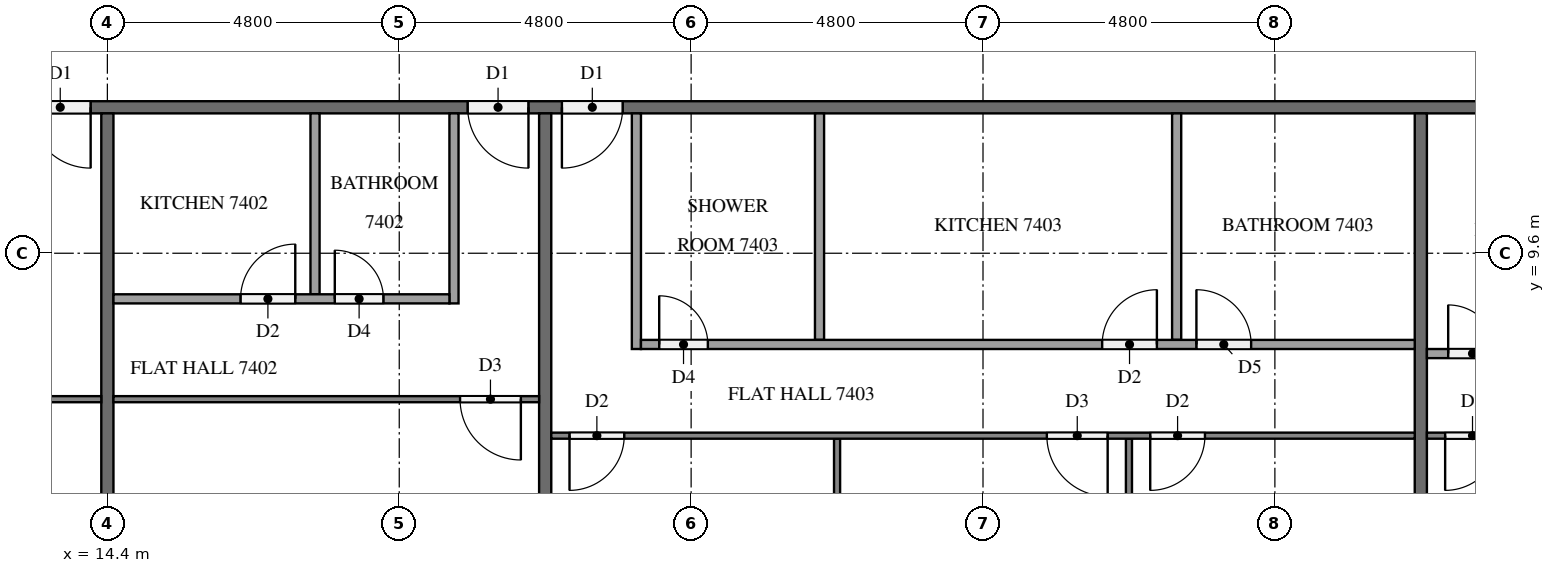
"""IFC4 building model, lengths in metres.
Left out: names, types, materials, properties, quantities, classifications, styles, units other than length and angle.
Written with IfcOpenShell. Run it as: python <this file> out.ifc"""

import sys

from ifc_helpers import new_model, si_unit, direction, frame, frame_2d, origin, place, context, subcontext, project, spatial, rectangle, extrude, element, fill, save


model = new_model("IFC4")
c1 = context("Model", 3, precision=1e-05, world=origin(), true_north=direction((0.0, 1.0)))
c2 = subcontext(c1, "Body", "Model", "MODEL_VIEW")
j1 = project(units=[si_unit("LENGTHUNIT", "METRE"), si_unit("PLANEANGLEUNIT", "RADIAN")], contexts=[c1])
p1 = place(None, origin())
s1 = spatial("IfcSite", under=j1, at=p1, CompositionType="ELEMENT")
p2 = place(p1, origin())
s2 = spatial("IfcBuilding", under=s1, at=p2, CompositionType="ELEMENT")
p3 = place(p2, frame((0.0, 0.0, 282.6)))
s3 = spatial("IfcBuildingStorey", under=s2, at=p3, CompositionType="ELEMENT", Elevation=282.6)
p4 = place(p3, frame((50.5, 12.0, 0.0), z_axis=(0.0, 0.0, 1.0), x_axis=(-1.0, 0.0, 0.0)))
e1 = element("IfcWall", 1, at=p4, inside=s3, PredefinedType="PARTITIONING", context=c2, shape_type="SweptSolid", body=[
    extrude(rectangle(XDim=38.6, YDim=0.2, at=frame_2d((19.3, 0.0))), origin(), (0.0, 0.0, 1.0), 3.2),
])
p5 = place(p4, frame((36.375, 0.0, 0.0)))
e2 = element("IfcOpeningElement", 2, at=p5, cuts=e1, PredefinedType="OPENING", context=c2, shape_type="SweptSolid", body=[
    extrude(rectangle(XDim=1.0, YDim=2.1, at=frame_2d((0.5, 1.05))), frame((0.0, 0.11, 0.0), z_axis=(0.0, -1.0, 0.0), x_axis=(1.0, 0.0, 0.0)), (0.0, 0.0, 1.0), 0.22),
])
p6 = place(p4, frame((29.175, 0.0, 0.0)))
e3 = element("IfcOpeningElement", 3, at=p6, cuts=e1, PredefinedType="OPENING", context=c2, shape_type="SweptSolid", body=[
    extrude(rectangle(XDim=1.0, YDim=2.1, at=frame_2d((0.5, 1.05))), frame((0.0, 0.11, 0.0), z_axis=(0.0, -1.0, 0.0), x_axis=(1.0, 0.0, 0.0)), (0.0, 0.0, 1.0), 0.22),
])
p7 = place(p4, frame((27.625, 0.0, 0.0)))
e4 = element("IfcOpeningElement", 4, at=p7, cuts=e1, PredefinedType="OPENING", context=c2, shape_type="SweptSolid", body=[
    extrude(rectangle(XDim=1.0, YDim=2.1, at=frame_2d((0.5, 1.05))), frame((0.0, 0.11, 0.0), z_axis=(0.0, -1.0, 0.0), x_axis=(1.0, 0.0, 0.0)), (0.0, 0.0, 1.0), 0.22),
])
p8 = place(p4, frame((2.775, 0.0, 0.0)))
e5 = element("IfcOpeningElement", 5, at=p8, cuts=e1, PredefinedType="OPENING", context=c2, shape_type="SweptSolid", body=[
    extrude(rectangle(XDim=1.0, YDim=2.1, at=frame_2d((0.5, 1.05))), frame((0.0, 0.11, 0.0), z_axis=(0.0, -1.0, 0.0), x_axis=(1.0, 0.0, 0.0)), (0.0, 0.0, 1.0), 0.22),
])
p9 = place(p4, frame((1.225, 0.0, 0.0)))
e6 = element("IfcOpeningElement", 6, at=p9, cuts=e1, PredefinedType="OPENING", context=c2, shape_type="SweptSolid", body=[
    extrude(rectangle(XDim=1.0, YDim=2.1, at=frame_2d((0.5, 1.05))), frame((0.0, 0.11, 0.0), z_axis=(0.0, -1.0, 0.0), x_axis=(1.0, 0.0, 0.0)), (0.0, 0.0, 1.0), 0.22),
])
p10 = place(p3, frame((14.4, 11.9, 0.0), z_axis=(0.0, 0.0, 1.0), x_axis=(0.0, -1.0, 0.0)))
e7 = element("IfcWall", 7, at=p10, inside=s3, PredefinedType="PARTITIONING", context=c2, shape_type="SweptSolid", body=[
    extrude(rectangle(XDim=11.65, YDim=0.2, at=frame_2d((5.825, 0.0))), origin(), (0.0, 0.0, 1.0), 3.2),
])
for number, where, z_axis, x_axis in (
    (8, (21.6, 11.9, 0.0), (0.0, 0.0, 1.0), (0.0, -1.0, 0.0)),
    (9, (36.0, 11.9, 0.0), (0.0, 0.0, 1.0), (0.0, -1.0, 0.0)),
):
    element("IfcWall", number, at=place(p3, frame(where, z_axis=z_axis, x_axis=x_axis)), inside=s3, PredefinedType="PARTITIONING", context=c2, shape_type="SweptSolid", body=[
        extrude(rectangle(XDim=11.8, YDim=0.2, at=frame_2d((5.9, 0.0))), origin(), (0.0, 0.0, 1.0), 3.2),
    ])
p11 = place(p3, frame((14.3, 7.2, 0.0), z_axis=(0.0, 0.0, 1.0), x_axis=(-1.0, 0.0, 0.0)))
e10 = element("IfcWall", 10, at=p11, inside=s3, PredefinedType="PARTITIONING", context=c2, shape_type="SweptSolid", body=[
    extrude(rectangle(XDim=14.2, YDim=0.1, at=frame_2d((7.1, 0.0))), origin(), (0.0, 0.0, 1.0), 3.2),
])
p12 = place(p11, frame((3.45, 0.0, 0.0)))
e11 = element("IfcOpeningElement", 11, at=p12, cuts=e10, PredefinedType="OPENING", context=c2, shape_type="SweptSolid", body=[
    extrude(rectangle(XDim=0.9, YDim=2.1, at=frame_2d((0.45, 1.05))), frame((0.0, 0.06, 0.0), z_axis=(0.0, -1.0, 0.0), x_axis=(1.0, 0.0, 0.0)), (0.0, 0.0, 1.0), 0.12),
])
p13 = place(p11, frame((5.05, 0.0, 0.0)))
e12 = element("IfcOpeningElement", 12, at=p13, cuts=e10, PredefinedType="OPENING", context=c2, shape_type="SweptSolid", body=[
    extrude(rectangle(XDim=0.9, YDim=2.1, at=frame_2d((0.45, 1.05))), frame((0.0, 0.06, 0.0), z_axis=(0.0, -1.0, 0.0), x_axis=(1.0, 0.0, 0.0)), (0.0, 0.0, 1.0), 0.12),
])
p14 = place(p11, frame((12.9, 0.0, 0.0)))
e13 = element("IfcOpeningElement", 13, at=p14, cuts=e10, PredefinedType="OPENING", context=c2, shape_type="SweptSolid", body=[
    extrude(rectangle(XDim=1.0, YDim=2.1, at=frame_2d((0.5, 1.05))), frame((0.0, 0.06, 0.0), z_axis=(0.0, -1.0, 0.0), x_axis=(1.0, 0.0, 0.0)), (0.0, 0.0, 1.0), 0.12),
])
p15 = place(p3, frame((21.5, 7.2, 0.0), z_axis=(0.0, 0.0, 1.0), x_axis=(-1.0, 0.0, 0.0)))
e14 = element("IfcWall", 14, at=p15, inside=s3, PredefinedType="PARTITIONING", context=c2, shape_type="SweptSolid", body=[
    extrude(rectangle(XDim=7.0, YDim=0.1, at=frame_2d((3.5, 0.0))), origin(), (0.0, 0.0, 1.0), 3.2),
])
p16 = place(p15, frame((0.3, 0.0, 0.0)))
e15 = element("IfcOpeningElement", 15, at=p16, cuts=e14, PredefinedType="OPENING", context=c2, shape_type="SweptSolid", body=[
    extrude(rectangle(XDim=1.0, YDim=2.1, at=frame_2d((0.5, 1.05))), frame((0.0, 0.06, 0.0), z_axis=(0.0, -1.0, 0.0), x_axis=(1.0, 0.0, 0.0)), (0.0, 0.0, 1.0), 0.12),
])
p17 = place(p3, frame((17.815, 11.9, 0.0), z_axis=(0.0, 0.0, 1.0), x_axis=(0.0, -1.0, 0.0)))
e16 = element("IfcWall", 16, at=p17, inside=s3, PredefinedType="PARTITIONING", context=c2, shape_type="SweptSolid", body=[
    extrude(rectangle(XDim=2.975, YDim=0.15, at=frame_2d((1.487, 0.0))), origin(), (0.0, 0.0, 1.0), 3.2),
])
p18 = place(p3, frame((20.1, 11.9, 0.0), z_axis=(0.0, 0.0, 1.0), x_axis=(0.0, -1.0, 0.0)))
e17 = element("IfcWall", 17, at=p18, inside=s3, PredefinedType="PARTITIONING", context=c2, shape_type="SweptSolid", body=[
    extrude(rectangle(XDim=3.125, YDim=0.15, at=frame_2d((1.562, 0.0))), origin(), (0.0, 0.0, 1.0), 3.2),
])
p19 = place(p3, frame((14.5, 8.85, 0.0), z_axis=(0.0, 0.0, 1.0), x_axis=(1.0, 0.0, 0.0)))
e18 = element("IfcWall", 18, at=p19, inside=s3, PredefinedType="PARTITIONING", context=c2, shape_type="SweptSolid", body=[
    extrude(rectangle(XDim=5.525, YDim=0.15, at=frame_2d((2.762, 0.0))), origin(), (0.0, 0.0, 1.0), 3.2),
])
p20 = place(p19, frame((3.64, 0.0, 0.0)))
e19 = element("IfcOpeningElement", 19, at=p20, cuts=e18, PredefinedType="OPENING", context=c2, shape_type="SweptSolid", body=[
    extrude(rectangle(XDim=0.8, YDim=2.1, at=frame_2d((0.4, 1.05))), frame((0.0, 0.085, 0.0), z_axis=(0.0, -1.0, 0.0), x_axis=(1.0, 0.0, 0.0)), (0.0, 0.0, 1.0), 0.17),
])
p21 = place(p19, frame((2.09, 0.0, 0.0)))
e20 = element("IfcOpeningElement", 20, at=p21, cuts=e18, PredefinedType="OPENING", context=c2, shape_type="SweptSolid", body=[
    extrude(rectangle(XDim=0.9, YDim=2.1, at=frame_2d((0.45, 1.05))), frame((0.0, 0.085, 0.0), z_axis=(0.0, -1.0, 0.0), x_axis=(1.0, 0.0, 0.0)), (0.0, 0.0, 1.0), 0.17),
])
for number, where, z_axis, x_axis in (
    (21, (26.4, 6.55, 0.0), (0.0, 0.0, 1.0), (0.0, -1.0, 0.0)),
    (22, (31.2, 6.55, 0.0), (0.0, 0.0, 1.0), (0.0, -1.0, 0.0)),
):
    element("IfcWall", number, at=place(p3, frame(where, z_axis=z_axis, x_axis=x_axis)), inside=s3, PredefinedType="PARTITIONING", context=c2, shape_type="SweptSolid", body=[
        extrude(rectangle(XDim=6.45, YDim=0.1, at=frame_2d((3.225, 0.0))), origin(), (0.0, 0.0, 1.0), 3.2),
    ])
p22 = place(p3, frame((35.9, 6.6, 0.0), z_axis=(0.0, 0.0, 1.0), x_axis=(-1.0, 0.0, 0.0)))
e23 = element("IfcWall", 23, at=p22, inside=s3, PredefinedType="PARTITIONING", context=c2, shape_type="SweptSolid", body=[
    extrude(rectangle(XDim=14.2, YDim=0.1, at=frame_2d((7.1, 0.0))), origin(), (0.0, 0.0, 1.0), 3.2),
])
p23 = place(p22, frame((13.0, 0.0, 0.0)))
e24 = element("IfcOpeningElement", 24, at=p23, cuts=e23, PredefinedType="OPENING", context=c2, shape_type="SweptSolid", body=[
    extrude(rectangle(XDim=0.9, YDim=2.1, at=frame_2d((0.45, 1.05))), frame((0.0, 0.06, 0.0), z_axis=(0.0, -1.0, 0.0), x_axis=(1.0, 0.0, 0.0)), (0.0, 0.0, 1.0), 0.12),
])
p24 = place(p22, frame((5.05, 0.0, 0.0)))
e25 = element("IfcOpeningElement", 25, at=p24, cuts=e23, PredefinedType="OPENING", context=c2, shape_type="SweptSolid", body=[
    extrude(rectangle(XDim=1.0, YDim=2.1, at=frame_2d((0.5, 1.05))), frame((0.0, 0.06, 0.0), z_axis=(0.0, -1.0, 0.0), x_axis=(1.0, 0.0, 0.0)), (0.0, 0.0, 1.0), 0.12),
])
p25 = place(p22, frame((3.45, 0.0, 0.0)))
e26 = element("IfcOpeningElement", 26, at=p25, cuts=e23, PredefinedType="OPENING", context=c2, shape_type="SweptSolid", body=[
    extrude(rectangle(XDim=0.9, YDim=2.1, at=frame_2d((0.45, 1.05))), frame((0.0, 0.06, 0.0), z_axis=(0.0, -1.0, 0.0), x_axis=(1.0, 0.0, 0.0)), (0.0, 0.0, 1.0), 0.12),
])
for number, where, z_axis, x_axis in (
    (27, (26.112, 11.9, 0.0), (0.0, 0.0, 1.0), (0.0, -1.0, 0.0)),
    (28, (31.985, 11.9, 0.0), (0.0, 0.0, 1.0), (0.0, -1.0, 0.0)),
):
    element("IfcWall", number, at=place(p3, frame(where, z_axis=z_axis, x_axis=x_axis)), inside=s3, PredefinedType="PARTITIONING", context=c2, shape_type="SweptSolid", body=[
        extrude(rectangle(XDim=3.725, YDim=0.15, at=frame_2d((1.862, 0.0))), origin(), (0.0, 0.0, 1.0), 3.2),
    ])
p26 = place(p3, frame((23.1, 11.9, 0.0), z_axis=(0.0, 0.0, 1.0), x_axis=(0.0, -1.0, 0.0)))
e29 = element("IfcWall", 29, at=p26, inside=s3, PredefinedType="PARTITIONING", context=c2, shape_type="SweptSolid", body=[
    extrude(rectangle(XDim=3.875, YDim=0.15, at=frame_2d((1.938, 0.0))), origin(), (0.0, 0.0, 1.0), 3.2),
])
p27 = place(p3, frame((23.175, 8.1, 0.0), z_axis=(0.0, 0.0, 1.0), x_axis=(1.0, 0.0, 0.0)))
e30 = element("IfcWall", 30, at=p27, inside=s3, PredefinedType="PARTITIONING", context=c2, shape_type="SweptSolid", body=[
    extrude(rectangle(XDim=12.725, YDim=0.15, at=frame_2d((6.362, 0.0))), origin(), (0.0, 0.0, 1.0), 3.2),
])
p28 = place(p27, frame((0.3, 0.0, 0.0)))
e31 = element("IfcOpeningElement", 31, at=p28, cuts=e30, PredefinedType="OPENING", context=c2, shape_type="SweptSolid", body=[
    extrude(rectangle(XDim=0.8, YDim=2.1, at=frame_2d((0.4, 1.05))), frame((0.0, 0.085, 0.0), z_axis=(0.0, -1.0, 0.0), x_axis=(1.0, 0.0, 0.0)), (0.0, 0.0, 1.0), 0.17),
])
p29 = place(p27, frame((7.585, 0.0, 0.0)))
e32 = element("IfcOpeningElement", 32, at=p29, cuts=e30, PredefinedType="OPENING", context=c2, shape_type="SweptSolid", body=[
    extrude(rectangle(XDim=0.9, YDim=2.1, at=frame_2d((0.45, 1.05))), frame((0.0, 0.085, 0.0), z_axis=(0.0, -1.0, 0.0), x_axis=(1.0, 0.0, 0.0)), (0.0, 0.0, 1.0), 0.17),
])
p30 = place(p27, frame((9.135, 0.0, 0.0)))
e33 = element("IfcOpeningElement", 33, at=p30, cuts=e30, PredefinedType="OPENING", context=c2, shape_type="SweptSolid", body=[
    extrude(rectangle(XDim=0.9, YDim=2.1, at=frame_2d((0.45, 1.05))), frame((0.0, 0.085, 0.0), z_axis=(0.0, -1.0, 0.0), x_axis=(1.0, 0.0, 0.0)), (0.0, 0.0, 1.0), 0.17),
])
p31 = place(p3, frame((47.9, 6.6, 0.0), z_axis=(0.0, 0.0, 1.0), x_axis=(-1.0, 0.0, 0.0)))
e34 = element("IfcWall", 34, at=p31, inside=s3, PredefinedType="PARTITIONING", context=c2, shape_type="SweptSolid", body=[
    extrude(rectangle(XDim=11.8, YDim=0.1, at=frame_2d((5.9, 0.0))), origin(), (0.0, 0.0, 1.0), 3.2),
])
p32 = place(p31, frame((0.3, 0.0, 0.0)))
e35 = element("IfcOpeningElement", 35, at=p32, cuts=e34, PredefinedType="OPENING", context=c2, shape_type="SweptSolid", body=[
    extrude(rectangle(XDim=1.0, YDim=2.1, at=frame_2d((0.5, 1.05))), frame((0.0, 0.06, 0.0), z_axis=(0.0, -1.0, 0.0), x_axis=(1.0, 0.0, 0.0)), (0.0, 0.0, 1.0), 0.12),
])
p33 = place(p31, frame((10.6, 0.0, 0.0)))
e36 = element("IfcOpeningElement", 36, at=p33, cuts=e34, PredefinedType="OPENING", context=c2, shape_type="SweptSolid", body=[
    extrude(rectangle(XDim=0.9, YDim=2.1, at=frame_2d((0.45, 1.05))), frame((0.0, 0.06, 0.0), z_axis=(0.0, -1.0, 0.0), x_axis=(1.0, 0.0, 0.0)), (0.0, 0.0, 1.0), 0.12),
])
p34 = place(p3, frame((36.1, 7.95, 0.0), z_axis=(0.0, 0.0, 1.0), x_axis=(1.0, 0.0, 0.0)))
e37 = element("IfcWall", 37, at=p34, inside=s3, PredefinedType="PARTITIONING", context=c2, shape_type="SweptSolid", body=[
    extrude(rectangle(XDim=10.325, YDim=0.15, at=frame_2d((5.163, 0.0))), origin(), (0.0, 0.0, 1.0), 3.2),
])
p35 = place(p34, frame((9.125, 0.0, 0.0)))
e38 = element("IfcOpeningElement", 38, at=p35, cuts=e37, PredefinedType="OPENING", context=c2, shape_type="SweptSolid", body=[
    extrude(rectangle(XDim=0.9, YDim=2.1, at=frame_2d((0.45, 1.05))), frame((0.0, 0.085, 0.0), z_axis=(0.0, -1.0, 0.0), x_axis=(1.0, 0.0, 0.0)), (0.0, 0.0, 1.0), 0.17),
])
p36 = place(p34, frame((0.35, 0.0, 0.0)))
e39 = element("IfcOpeningElement", 39, at=p36, cuts=e37, PredefinedType="OPENING", context=c2, shape_type="SweptSolid", body=[
    extrude(rectangle(XDim=0.8, YDim=2.1, at=frame_2d((0.4, 1.05))), frame((0.0, 0.085, 0.0), z_axis=(0.0, -1.0, 0.0), x_axis=(1.0, 0.0, 0.0)), (0.0, 0.0, 1.0), 0.17),
])
p37 = place(p5, origin())
e40 = element("IfcDoor", 40, at=p37, inside=s3, OperationType="SINGLE_SWING_LEFT", PredefinedType="DOOR", context=c2, shape_type="SweptSolid", body=[
    extrude(rectangle(XDim=1.0, YDim=2.1, at=frame_2d((0.5, 1.05))), frame((0.0, 0.025, 0.0), z_axis=(0.0, -1.0, 0.0), x_axis=(1.0, 0.0, 0.0)), (0.0, 0.0, 1.0), 0.05),
])
fill(e2, e40)
p38 = place(p6, origin())
e41 = element("IfcDoor", 41, at=p38, inside=s3, OperationType="SINGLE_SWING_LEFT", PredefinedType="DOOR", context=c2, shape_type="SweptSolid", body=[
    extrude(rectangle(XDim=1.0, YDim=2.1, at=frame_2d((0.5, 1.05))), frame((0.0, 0.025, 0.0), z_axis=(0.0, -1.0, 0.0), x_axis=(1.0, 0.0, 0.0)), (0.0, 0.0, 1.0), 0.05),
])
fill(e3, e41)
p39 = place(p7, origin())
e42 = element("IfcDoor", 42, at=p39, inside=s3, OperationType="SINGLE_SWING_RIGHT", PredefinedType="DOOR", context=c2, shape_type="SweptSolid", body=[
    extrude(rectangle(XDim=1.0, YDim=2.1, at=frame_2d((0.5, 1.05))), frame((0.0, 0.025, 0.0), z_axis=(0.0, -1.0, 0.0), x_axis=(1.0, 0.0, 0.0)), (0.0, 0.0, 1.0), 0.05),
])
fill(e4, e42)
p40 = place(p16, origin())
e43 = element("IfcDoor", 43, at=p40, inside=s3, OperationType="SINGLE_SWING_LEFT", PredefinedType="DOOR", context=c2, shape_type="SweptSolid", body=[
    extrude(rectangle(XDim=1.0, YDim=2.1, at=frame_2d((0.5, 1.05))), frame((0.0, 0.025, 0.0), z_axis=(0.0, -1.0, 0.0), x_axis=(1.0, 0.0, 0.0)), (0.0, 0.0, 1.0), 0.05),
])
fill(e15, e43)
p41 = place(p20, origin())
e44 = element("IfcDoor", 44, at=p41, inside=s3, OperationType="SINGLE_SWING_LEFT", PredefinedType="DOOR", context=c2, shape_type="SweptSolid", body=[
    extrude(rectangle(XDim=0.8, YDim=2.1, at=frame_2d((0.4, 1.05))), frame((0.0, 0.025, 0.0), z_axis=(0.0, -1.0, 0.0), x_axis=(1.0, 0.0, 0.0)), (0.0, 0.0, 1.0), 0.05),
])
fill(e19, e44)
p42 = place(p21, origin())
e45 = element("IfcDoor", 45, at=p42, inside=s3, OperationType="SINGLE_SWING_RIGHT", PredefinedType="DOOR", context=c2, shape_type="SweptSolid", body=[
    extrude(rectangle(XDim=0.9, YDim=2.1, at=frame_2d((0.45, 1.05))), frame((0.0, 0.025, 0.0), z_axis=(0.0, -1.0, 0.0), x_axis=(1.0, 0.0, 0.0)), (0.0, 0.0, 1.0), 0.05),
])
fill(e20, e45)
p43 = place(p23, origin())
e46 = element("IfcDoor", 46, at=p43, inside=s3, OperationType="SINGLE_SWING_RIGHT", PredefinedType="DOOR", context=c2, shape_type="SweptSolid", body=[
    extrude(rectangle(XDim=0.9, YDim=2.1, at=frame_2d((0.45, 1.05))), frame((0.0, 0.025, 0.0), z_axis=(0.0, -1.0, 0.0), x_axis=(1.0, 0.0, 0.0)), (0.0, 0.0, 1.0), 0.05),
])
fill(e24, e46)
p44 = place(p24, origin())
e47 = element("IfcDoor", 47, at=p44, inside=s3, OperationType="SINGLE_SWING_LEFT", PredefinedType="DOOR", context=c2, shape_type="SweptSolid", body=[
    extrude(rectangle(XDim=1.0, YDim=2.1, at=frame_2d((0.5, 1.05))), frame((0.0, 0.025, 0.0), z_axis=(0.0, -1.0, 0.0), x_axis=(1.0, 0.0, 0.0)), (0.0, 0.0, 1.0), 0.05),
])
fill(e25, e47)
p45 = place(p25, origin())
e48 = element("IfcDoor", 48, at=p45, inside=s3, OperationType="SINGLE_SWING_RIGHT", PredefinedType="DOOR", context=c2, shape_type="SweptSolid", body=[
    extrude(rectangle(XDim=0.9, YDim=2.1, at=frame_2d((0.45, 1.05))), frame((0.0, 0.025, 0.0), z_axis=(0.0, -1.0, 0.0), x_axis=(1.0, 0.0, 0.0)), (0.0, 0.0, 1.0), 0.05),
])
fill(e26, e48)
p46 = place(p28, origin())
e49 = element("IfcDoor", 49, at=p46, inside=s3, OperationType="SINGLE_SWING_LEFT", PredefinedType="DOOR", context=c2, shape_type="SweptSolid", body=[
    extrude(rectangle(XDim=0.8, YDim=2.1, at=frame_2d((0.4, 1.05))), frame((0.0, 0.025, 0.0), z_axis=(0.0, -1.0, 0.0), x_axis=(1.0, 0.0, 0.0)), (0.0, 0.0, 1.0), 0.05),
])
fill(e31, e49)
p47 = place(p29, origin())
e50 = element("IfcDoor", 50, at=p47, inside=s3, OperationType="SINGLE_SWING_RIGHT", PredefinedType="DOOR", context=c2, shape_type="SweptSolid", body=[
    extrude(rectangle(XDim=0.9, YDim=2.1, at=frame_2d((0.45, 1.05))), frame((0.0, 0.025, 0.0), z_axis=(0.0, -1.0, 0.0), x_axis=(1.0, 0.0, 0.0)), (0.0, 0.0, 1.0), 0.05),
])
fill(e32, e50)
p48 = place(p30, origin())
e51 = element("IfcDoor", 51, at=p48, inside=s3, OperationType="SINGLE_SWING_LEFT", PredefinedType="DOOR", context=c2, shape_type="SweptSolid", body=[
    extrude(rectangle(XDim=0.9, YDim=2.1, at=frame_2d((0.45, 1.05))), frame((0.0, 0.025, 0.0), z_axis=(0.0, -1.0, 0.0), x_axis=(1.0, 0.0, 0.0)), (0.0, 0.0, 1.0), 0.05),
])
fill(e33, e51)
p49 = place(p33, origin())
e52 = element("IfcDoor", 52, at=p49, inside=s3, OperationType="SINGLE_SWING_RIGHT", PredefinedType="DOOR", context=c2, shape_type="SweptSolid", body=[
    extrude(rectangle(XDim=0.9, YDim=2.1, at=frame_2d((0.45, 1.05))), frame((0.0, 0.025, 0.0), z_axis=(0.0, -1.0, 0.0), x_axis=(1.0, 0.0, 0.0)), (0.0, 0.0, 1.0), 0.05),
])
fill(e36, e52)
p50 = place(p36, origin())
e53 = element("IfcDoor", 53, at=p50, inside=s3, OperationType="SINGLE_SWING_LEFT", PredefinedType="DOOR", context=c2, shape_type="SweptSolid", body=[
    extrude(rectangle(XDim=0.8, YDim=2.1, at=frame_2d((0.4, 1.05))), frame((0.0, 0.025, 0.0), z_axis=(0.0, -1.0, 0.0), x_axis=(1.0, 0.0, 0.0)), (0.0, 0.0, 1.0), 0.05),
])
fill(e39, e53)
save(model, sys.argv[1])
